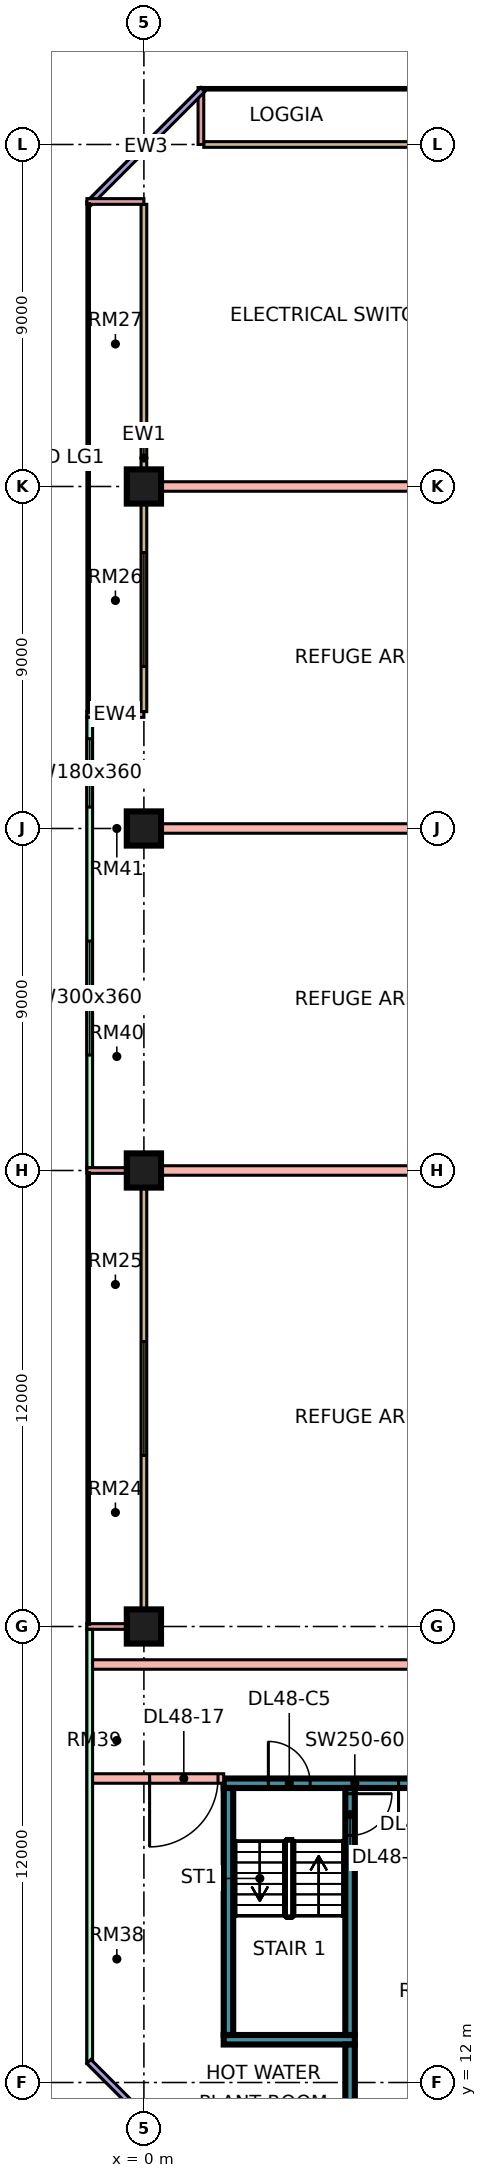
"""IFC4 building model, lengths in metres.
Left out: names, types, materials, properties, quantities, classifications, styles, units other than length and angle.
Written with IfcOpenShell. Run it as: python <this file> out.ifc"""

import sys

from ifc_helpers import new_model, si_unit, direction, frame, frame_2d, origin, origin_2d, place, context, subcontext, project, spatial, rectangle, extrude, element, fill, save


model = new_model("IFC4")
c1 = context("Model", 3, precision=1e-05, world=origin(), true_north=direction((0.0, 1.0)))
c2 = subcontext(c1, "Body", "Model", "MODEL_VIEW")
j1 = project(units=[si_unit("LENGTHUNIT", "METRE"), si_unit("PLANEANGLEUNIT", "RADIAN")], contexts=[c1])
p1 = place(None, origin())
s1 = spatial("IfcSite", under=j1, at=p1, CompositionType="ELEMENT")
p2 = place(p1, origin())
s2 = spatial("IfcBuilding", under=s1, at=p2, CompositionType="ELEMENT")
p3 = place(p2, frame((0.0, 0.0, 206.15)))
s3 = spatial("IfcBuildingStorey", under=s2, at=p3, CompositionType="ELEMENT", Elevation=206.15)
p4 = place(p3, frame((0.0, 24.0, 0.0), z_axis=(0.0, 0.0, 1.0), x_axis=(1.0, 0.0, 0.0)))
e1 = element("IfcColumn", 1, at=p4, inside=s3, PredefinedType="COLUMN", context=c2, shape_type="SweptSolid", body=[
    extrude(rectangle(XDim=0.9, YDim=0.9, at=origin_2d()), origin(), (0.0, 0.0, 1.0), 5.5),
])
p5 = place(p3, frame((0.0, 36.0, 0.0), z_axis=(0.0, 0.0, 1.0), x_axis=(1.0, 0.0, 0.0)))
e2 = element("IfcColumn", 2, at=p5, inside=s3, PredefinedType="COLUMN", context=c2, shape_type="SweptSolid", body=[
    extrude(rectangle(XDim=0.9, YDim=0.9, at=origin_2d()), origin(), (0.0, 0.0, 1.0), 5.5),
])
p6 = place(p3, frame((0.0, 45.0, 0.0), z_axis=(0.0, 0.0, 1.0), x_axis=(1.0, 0.0, 0.0)))
e3 = element("IfcColumn", 3, at=p6, inside=s3, PredefinedType="COLUMN", context=c2, shape_type="SweptSolid", body=[
    extrude(rectangle(XDim=0.9, YDim=0.9, at=origin_2d()), origin(), (0.0, 0.0, 1.0), 5.5),
])
p7 = place(p3, frame((0.0, 54.0, 0.0), z_axis=(0.0, 0.0, 1.0), x_axis=(1.0, 0.0, 0.0)))
e4 = element("IfcColumn", 4, at=p7, inside=s3, PredefinedType="COLUMN", context=c2, shape_type="SweptSolid", body=[
    extrude(rectangle(XDim=0.9, YDim=0.9, at=origin_2d()), origin(), (0.0, 0.0, 1.0), 5.5),
])
p8 = place(p3, frame((2.1, 19.875, 0.0), z_axis=(0.0, 0.0, 1.0), x_axis=(1.0, 0.0, 0.0)))
e5 = element("IfcWall", 5, at=p8, inside=s3, PredefinedType="SHEAR", context=c2, shape_type="SweptSolid", body=[
    extrude(rectangle(XDim=6.9, YDim=0.25, at=frame_2d((3.45, 0.0))), origin(), (0.0, 0.0, 1.0), 5.5),
])
p9 = place(p8, frame((1.175, 0.0, 0.0)))
e6 = element("IfcOpeningElement", 6, at=p9, cuts=e5, PredefinedType="OPENING", context=c2, shape_type="SweptSolid", body=[
    extrude(rectangle(XDim=1.1, YDim=2.2, at=frame_2d((0.55, 1.1))), frame((0.0, 0.135, 0.0), z_axis=(0.0, -1.0, 0.0), x_axis=(1.0, 0.0, 0.0)), (0.0, 0.0, 1.0), 0.27),
])
p10 = place(p8, frame((4.6, 0.0, 0.0)))
e7 = element("IfcOpeningElement", 7, at=p10, cuts=e5, PredefinedType="OPENING", context=c2, shape_type="SweptSolid", body=[
    extrude(rectangle(XDim=1.2, YDim=2.2, at=frame_2d((0.6, 1.1))), frame((0.0, 0.135, 0.0), z_axis=(0.0, -1.0, 0.0), x_axis=(1.0, 0.0, 0.0)), (0.0, 0.0, 1.0), 0.27),
])
p11 = place(p3, frame((2.1, 13.125, 0.0), z_axis=(0.0, 0.0, 1.0), x_axis=(1.0, 0.0, 0.0)))
e8 = element("IfcWall", 8, at=p11, inside=s3, PredefinedType="SHEAR", context=c2, shape_type="SweptSolid", body=[
    extrude(rectangle(XDim=3.45, YDim=0.25, at=frame_2d((1.725, 0.0))), origin(), (0.0, 0.0, 1.0), 5.5),
])
p12 = place(p3, frame((2.225, 13.25, 0.0), z_axis=(0.0, 0.0, 1.0), x_axis=(0.0, 1.0, 0.0)))
e9 = element("IfcWall", 9, at=p12, inside=s3, PredefinedType="SHEAR", context=c2, shape_type="SweptSolid", body=[
    extrude(rectangle(XDim=6.5, YDim=0.25, at=frame_2d((3.25, 0.0))), origin(), (0.0, 0.0, 1.0), 5.5),
])
p13 = place(p3, frame((5.425, 13.25, 0.0), z_axis=(0.0, 0.0, 1.0), x_axis=(0.0, 1.0, 0.0)))
e10 = element("IfcWall", 10, at=p13, inside=s3, PredefinedType="SHEAR", context=c2, shape_type="SweptSolid", body=[
    extrude(rectangle(XDim=6.5, YDim=0.25, at=frame_2d((3.25, 0.0))), origin(), (0.0, 0.0, 1.0), 5.5),
])
p14 = place(p13, frame((5.25, 0.0, 0.0)))
e11 = element("IfcOpeningElement", 11, at=p14, cuts=e10, PredefinedType="OPENING", context=c2, shape_type="SweptSolid", body=[
    extrude(rectangle(XDim=1.1, YDim=2.2, at=frame_2d((0.55, 1.1))), frame((0.0, 0.135, 0.0), z_axis=(0.0, -1.0, 0.0), x_axis=(1.0, 0.0, 0.0)), (0.0, 0.0, 1.0), 0.27),
])
p15 = place(p3, frame((5.425, 9.0, 0.0), z_axis=(0.0, 0.0, 1.0), x_axis=(0.0, 1.0, 0.0)))
e12 = element("IfcWall", 12, at=p15, inside=s3, PredefinedType="SHEAR", context=c2, shape_type="SweptSolid", body=[
    extrude(rectangle(XDim=4.0, YDim=0.25, at=frame_2d((2.0, 0.0))), origin(), (0.0, 0.0, 1.0), 5.5),
])
p16 = place(p3, frame((11.925, 63.0, 0.0), z_axis=(0.0, 0.0, 1.0), x_axis=(-1.0, 0.0, 0.0)))
e13 = element("IfcWall", 13, at=p16, inside=s3, PredefinedType="SOLIDWALL", context=c2, shape_type="SweptSolid", body=[
    extrude(rectangle(XDim=10.35, YDim=0.15, at=frame_2d((5.175, 0.0))), origin(), (0.0, 0.0, 1.0), 5.1),
])
p17 = place(p3, frame((1.5, 64.5, 0.0), z_axis=(0.0, 0.0, 1.0), x_axis=(0.0, -1.0, 0.0)))
e14 = element("IfcWall", 14, at=p17, inside=s3, PredefinedType="SOLIDWALL", context=c2, shape_type="SweptSolid", body=[
    extrude(rectangle(XDim=1.5, YDim=0.15, at=frame_2d((0.75, 0.0))), origin(), (0.0, 0.0, 1.0), 5.1),
])
p18 = place(p3, frame((1.553, 64.447, 0.0), z_axis=(0.0, 0.0, 1.0), x_axis=(-0.707106781187, -0.707106781187, 0.0)))
e15 = element("IfcWall", 15, at=p18, inside=s3, PredefinedType="SOLIDWALL", context=c2, shape_type="SweptSolid", body=[
    extrude(rectangle(XDim=4.243, YDim=0.15, at=frame_2d((2.121, 0.0))), origin(), (0.0, 0.0, 1.0), 5.1),
])
p19 = place(p3, frame((0.0, 61.425, 0.0), z_axis=(0.0, 0.0, 1.0), x_axis=(0.0, -1.0, 0.0)))
e16 = element("IfcWall", 16, at=p19, inside=s3, PredefinedType="SOLIDWALL", context=c2, shape_type="SweptSolid", body=[
    extrude(rectangle(XDim=13.35, YDim=0.15, at=frame_2d((6.675, 0.0))), origin(), (0.0, 0.0, 1.0), 5.1),
])
p20 = place(p19, frame((9.163, 0.0, 0.45)))
e17 = element("IfcOpeningElement", 17, at=p20, cuts=e16, PredefinedType="OPENING", context=c2, shape_type="SweptSolid", body=[
    extrude(rectangle(XDim=3.0, YDim=3.6, at=frame_2d((1.5, 1.8))), frame((0.0, 0.085, 0.0), z_axis=(0.0, -1.0, 0.0), x_axis=(1.0, 0.0, 0.0)), (0.0, 0.0, 1.0), 0.17),
])
for number, where, z_axis, x_axis in (
    (18, (-1.5, 61.5, 0.0), (0.0, 0.0, 1.0), (1.0, 0.0, 0.0)),
    (19, (-1.5, 48.0, 0.0), (0.0, 0.0, 1.0), (1.0, 0.0, 0.0)),
):
    element("IfcWall", number, at=place(p3, frame(where, z_axis=z_axis, x_axis=x_axis)), inside=s3, PredefinedType="SOLIDWALL", context=c2, shape_type="SweptSolid", body=[
        extrude(rectangle(XDim=1.5, YDim=0.15, at=frame_2d((0.75, 0.0))), origin(), (0.0, 0.0, 1.0), 5.1),
    ])
p21 = place(p3, frame((-1.425, 47.925, 0.0), z_axis=(0.0, 0.0, 1.0), x_axis=(0.0, -1.0, 0.0)))
e20 = element("IfcWall", 20, at=p21, inside=s3, PredefinedType="SOLIDWALL", context=c2, shape_type="SweptSolid", body=[
    extrude(rectangle(XDim=11.85, YDim=0.15, at=frame_2d((5.925, 0.0))), origin(), (0.0, 0.0, 1.0), 5.1),
])
p22 = place(p21, frame((0.562, 0.0, 0.45)))
e21 = element("IfcOpeningElement", 21, at=p22, cuts=e20, PredefinedType="OPENING", context=c2, shape_type="SweptSolid", body=[
    extrude(rectangle(XDim=1.8, YDim=3.6, at=frame_2d((0.9, 1.8))), frame((0.0, 0.085, 0.0), z_axis=(0.0, -1.0, 0.0), x_axis=(1.0, 0.0, 0.0)), (0.0, 0.0, 1.0), 0.17),
])
p23 = place(p21, frame((5.887, 0.0, 0.45)))
e22 = element("IfcOpeningElement", 22, at=p23, cuts=e20, PredefinedType="OPENING", context=c2, shape_type="SweptSolid", body=[
    extrude(rectangle(XDim=3.0, YDim=3.6, at=frame_2d((1.5, 1.8))), frame((0.0, 0.085, 0.0), z_axis=(0.0, -1.0, 0.0), x_axis=(1.0, 0.0, 0.0)), (0.0, 0.0, 1.0), 0.17),
])
p24 = place(p3, frame((0.0, 35.925, 0.0), z_axis=(0.0, 0.0, 1.0), x_axis=(0.0, -1.0, 0.0)))
e23 = element("IfcWall", 23, at=p24, inside=s3, PredefinedType="SOLIDWALL", context=c2, shape_type="SweptSolid", body=[
    extrude(rectangle(XDim=11.85, YDim=0.15, at=frame_2d((5.925, 0.0))), origin(), (0.0, 0.0, 1.0), 5.1),
])
p25 = place(p24, frame((4.425, 0.0, 0.45)))
e24 = element("IfcOpeningElement", 24, at=p25, cuts=e23, PredefinedType="OPENING", context=c2, shape_type="SweptSolid", body=[
    extrude(rectangle(XDim=3.0, YDim=3.6, at=frame_2d((1.5, 1.8))), frame((0.0, 0.085, 0.0), z_axis=(0.0, -1.0, 0.0), x_axis=(1.0, 0.0, 0.0)), (0.0, 0.0, 1.0), 0.17),
])
for number, where, z_axis, x_axis in (
    (25, (-1.5, 36.0, 0.0), (0.0, 0.0, 1.0), (1.0, 0.0, 0.0)),
    (26, (-1.5, 24.0, 0.0), (0.0, 0.0, 1.0), (1.0, 0.0, 0.0)),
):
    element("IfcWall", number, at=place(p3, frame(where, z_axis=z_axis, x_axis=x_axis)), inside=s3, PredefinedType="SOLIDWALL", context=c2, shape_type="SweptSolid", body=[
        extrude(rectangle(XDim=1.5, YDim=0.15, at=frame_2d((0.75, 0.0))), origin(), (0.0, 0.0, 1.0), 5.1),
    ])
p26 = place(p3, frame((-1.425, 23.925, 0.0), z_axis=(0.0, 0.0, 1.0), x_axis=(0.0, -1.0, 0.0)))
e27 = element("IfcWall", 27, at=p26, inside=s3, PredefinedType="SOLIDWALL", context=c2, shape_type="SweptSolid", body=[
    extrude(rectangle(XDim=11.425, YDim=0.15, at=frame_2d((5.712, 0.0))), origin(), (0.0, 0.0, 1.0), 5.1),
])
p27 = place(p3, frame((-1.447, 12.553, 0.0), z_axis=(0.0, 0.0, 1.0), x_axis=(0.707106781187, -0.707106781187, 0.0)))
e28 = element("IfcWall", 28, at=p27, inside=s3, PredefinedType="SOLIDWALL", context=c2, shape_type="SweptSolid", body=[
    extrude(rectangle(XDim=19.799, YDim=0.15, at=frame_2d((9.899, 0.0))), origin(), (0.0, 0.0, 1.0), 5.1),
])
p28 = place(p27, frame((11.453, 0.0, 0.45)))
e29 = element("IfcOpeningElement", 29, at=p28, cuts=e28, PredefinedType="OPENING", context=c2, shape_type="SweptSolid", body=[
    extrude(rectangle(XDim=3.0, YDim=3.6, at=frame_2d((1.5, 1.8))), frame((0.0, 0.085, 0.0), z_axis=(0.0, -1.0, 0.0), x_axis=(1.0, 0.0, 0.0)), (0.0, 0.0, 1.0), 0.17),
])
p29 = place(p3, frame((-1.35, 20.0, 0.0), z_axis=(0.0, 0.0, 1.0), x_axis=(1.0, 0.0, 0.0)))
e30 = element("IfcWall", 30, at=p29, inside=s3, PredefinedType="PARTITIONING", context=c2, shape_type="SweptSolid", body=[
    extrude(rectangle(XDim=3.45, YDim=0.25, at=frame_2d((1.725, 0.0))), origin(), (0.0, 0.0, 1.0), 5.1),
])
p30 = place(p29, frame((1.5, 0.0, 0.0)))
e31 = element("IfcOpeningElement", 31, at=p30, cuts=e30, PredefinedType="OPENING", context=c2, shape_type="SweptSolid", body=[
    extrude(rectangle(XDim=1.8, YDim=2.1, at=frame_2d((0.9, 1.05))), frame((0.0, 0.135, 0.0), z_axis=(0.0, -1.0, 0.0), x_axis=(1.0, 0.0, 0.0)), (0.0, 0.0, 1.0), 0.27),
])
p31 = place(p3, frame((-1.35, 23.0, 0.0), z_axis=(0.0, 0.0, 1.0), x_axis=(1.0, 0.0, 0.0)))
e32 = element("IfcWall", 32, at=p31, inside=s3, PredefinedType="PARTITIONING", context=c2, shape_type="SweptSolid", body=[
    extrude(rectangle(XDim=13.475, YDim=0.25, at=frame_2d((6.738, 0.0))), origin(), (0.0, 0.0, 1.0), 5.1),
])
e33 = element("IfcWall", 33, at=p5, inside=s3, PredefinedType="PARTITIONING", context=c2, shape_type="SweptSolid", body=[
    extrude(rectangle(XDim=11.601, YDim=0.25, at=frame_2d((5.801, 0.0))), origin(), (0.0, 0.0, 1.0), 5.1),
])
e34 = element("IfcWall", 34, at=p6, inside=s3, PredefinedType="PARTITIONING", context=c2, shape_type="SweptSolid", body=[
    extrude(rectangle(XDim=11.601, YDim=0.25, at=frame_2d((5.801, 0.0))), origin(), (0.0, 0.0, 1.0), 5.1),
])
p32 = place(p3, frame((0.074, 54.0, 0.0), z_axis=(0.0, 0.0, 1.0), x_axis=(1.0, 0.0, 0.0)))
e35 = element("IfcWall", 35, at=p32, inside=s3, PredefinedType="PARTITIONING", context=c2, shape_type="SweptSolid", body=[
    extrude(rectangle(XDim=11.527, YDim=0.25, at=frame_2d((5.764, 0.0))), origin(), (0.0, 0.0, 1.0), 5.1),
])
p33 = place(p20, origin())
e36 = element("IfcWindow", 36, at=p33, inside=s3, PartitioningType="SINGLE_PANEL", PredefinedType="WINDOW", context=c2, shape_type="SweptSolid", body=[
    extrude(rectangle(XDim=3.0, YDim=3.6, at=frame_2d((1.5, 1.8))), frame((0.0, 0.03, 0.0), z_axis=(0.0, -1.0, 0.0), x_axis=(1.0, 0.0, 0.0)), (0.0, 0.0, 1.0), 0.06),
])
fill(e17, e36)
p34 = place(p22, origin())
e37 = element("IfcWindow", 37, at=p34, inside=s3, PartitioningType="SINGLE_PANEL", PredefinedType="WINDOW", context=c2, shape_type="SweptSolid", body=[
    extrude(rectangle(XDim=1.8, YDim=3.6, at=frame_2d((0.9, 1.8))), frame((0.0, 0.03, 0.0), z_axis=(0.0, -1.0, 0.0), x_axis=(1.0, 0.0, 0.0)), (0.0, 0.0, 1.0), 0.06),
])
fill(e21, e37)
p35 = place(p23, origin())
e38 = element("IfcWindow", 38, at=p35, inside=s3, PartitioningType="SINGLE_PANEL", PredefinedType="WINDOW", context=c2, shape_type="SweptSolid", body=[
    extrude(rectangle(XDim=3.0, YDim=3.6, at=frame_2d((1.5, 1.8))), frame((0.0, 0.03, 0.0), z_axis=(0.0, -1.0, 0.0), x_axis=(1.0, 0.0, 0.0)), (0.0, 0.0, 1.0), 0.06),
])
fill(e22, e38)
p36 = place(p25, origin())
e39 = element("IfcWindow", 39, at=p36, inside=s3, PartitioningType="SINGLE_PANEL", PredefinedType="WINDOW", context=c2, shape_type="SweptSolid", body=[
    extrude(rectangle(XDim=3.0, YDim=3.6, at=frame_2d((1.5, 1.8))), frame((0.0, 0.03, 0.0), z_axis=(0.0, -1.0, 0.0), x_axis=(1.0, 0.0, 0.0)), (0.0, 0.0, 1.0), 0.06),
])
fill(e24, e39)
p37 = place(p14, origin())
e40 = element("IfcDoor", 40, at=p37, inside=s3, OperationType="SINGLE_SWING_RIGHT", PredefinedType="DOOR", context=c2, shape_type="SweptSolid", body=[
    extrude(rectangle(XDim=1.1, YDim=2.2, at=frame_2d((0.55, 1.1))), frame((0.0, 0.025, 0.0), z_axis=(0.0, -1.0, 0.0), x_axis=(1.0, 0.0, 0.0)), (0.0, 0.0, 1.0), 0.05),
])
fill(e11, e40)
p38 = place(p9, origin())
e41 = element("IfcDoor", 41, at=p38, inside=s3, OperationType="SINGLE_SWING_LEFT", PredefinedType="DOOR", context=c2, shape_type="SweptSolid", body=[
    extrude(rectangle(XDim=1.1, YDim=2.2, at=frame_2d((0.55, 1.1))), frame((0.0, 0.025, 0.0), z_axis=(0.0, -1.0, 0.0), x_axis=(1.0, 0.0, 0.0)), (0.0, 0.0, 1.0), 0.05),
])
fill(e6, e41)
p39 = place(p10, frame((1.2, 0.0, 0.0), z_axis=(0.0, 0.0, 1.0), x_axis=(-1.0, 0.0, 0.0)))
e42 = element("IfcDoor", 42, at=p39, inside=s3, OperationType="SINGLE_SWING_LEFT", PredefinedType="DOOR", context=c2, shape_type="SweptSolid", body=[
    extrude(rectangle(XDim=1.2, YDim=2.2, at=frame_2d((0.6, 1.1))), frame((0.0, 0.025, 0.0), z_axis=(0.0, -1.0, 0.0), x_axis=(1.0, 0.0, 0.0)), (0.0, 0.0, 1.0), 0.05),
])
fill(e7, e42)
p40 = place(p30, frame((1.8, 0.0, 0.0), z_axis=(0.0, 0.0, 1.0), x_axis=(-1.0, 0.0, 0.0)))
e43 = element("IfcDoor", 43, at=p40, inside=s3, OperationType="DOUBLE_DOOR_SINGLE_SWING", PredefinedType="DOOR", context=c2, shape_type="SweptSolid", body=[
    extrude(rectangle(XDim=1.8, YDim=2.1, at=frame_2d((0.9, 1.05))), frame((0.0, 0.025, 0.0), z_axis=(0.0, -1.0, 0.0), x_axis=(1.0, 0.0, 0.0)), (0.0, 0.0, 1.0), 0.05),
])
fill(e31, e43)
save(model, sys.argv[1])
